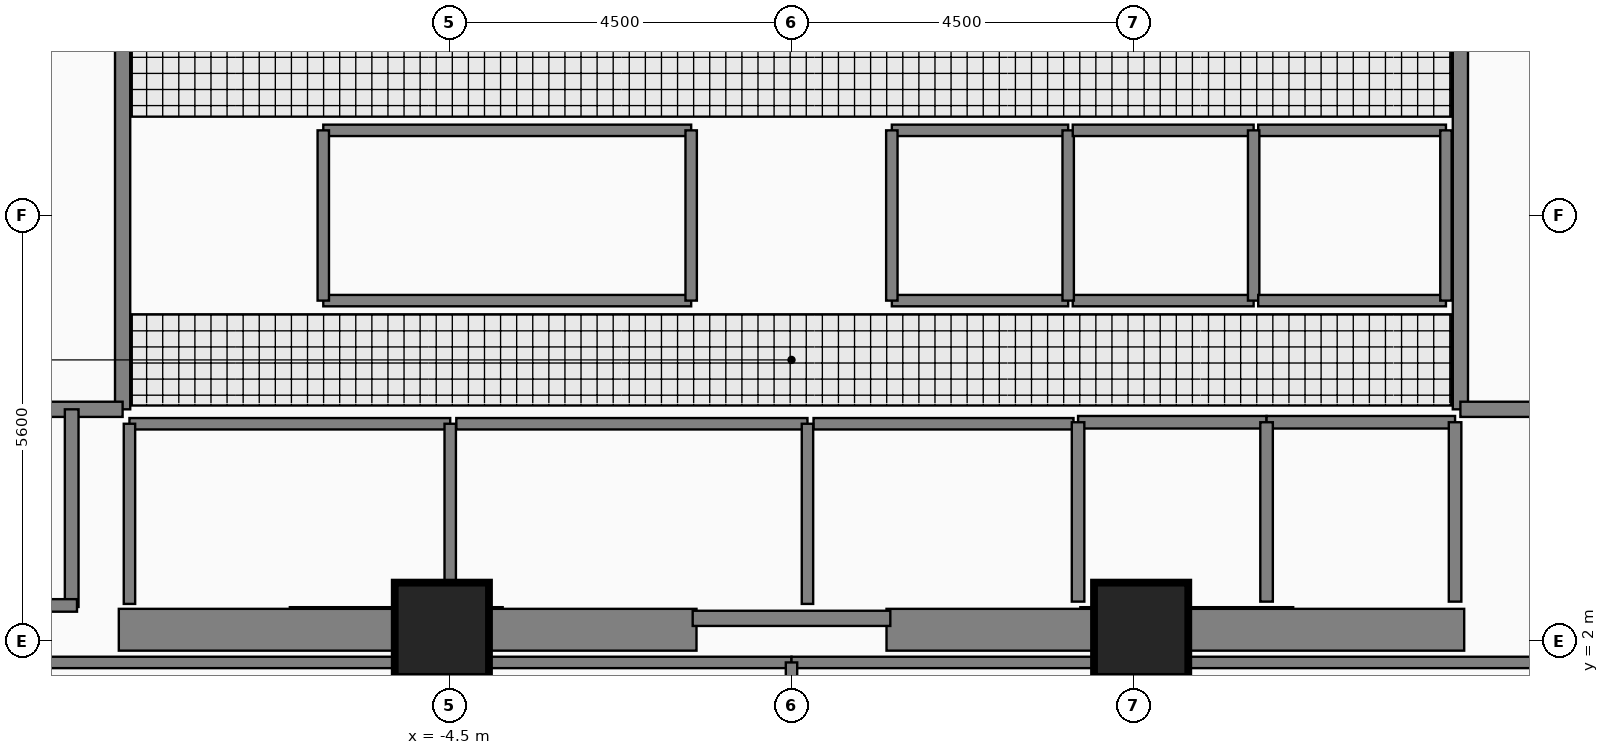
"""IFC4 building model, lengths in metres.
Left out: names, types, materials, properties, quantities, classifications, styles, units other than length and angle.
Written with IfcOpenShell. Run it as: python <this file> out.ifc"""

import sys

from ifc_helpers import new_model, si_unit, direction, frame, frame_2d, origin, origin_2d, place, context, subcontext, project, spatial, rectangle, extrude, element, fill, save


model = new_model("IFC4")
c1 = context("Model", 3, precision=1e-05, world=origin(), true_north=direction((0.0, 1.0)))
c2 = subcontext(c1, "Body", "Model", "MODEL_VIEW")
j1 = project(units=[si_unit("LENGTHUNIT", "METRE"), si_unit("PLANEANGLEUNIT", "RADIAN")], contexts=[c1])
p1 = place(None, origin())
s1 = spatial("IfcSite", under=j1, at=p1, CompositionType="ELEMENT")
p2 = place(p1, origin())
s2 = spatial("IfcBuilding", under=s1, at=p2, CompositionType="ELEMENT")
p3 = place(p2, frame((0.0, 0.0, 284.05)))
s3 = spatial("IfcBuildingStorey", under=s2, at=p3, CompositionType="ELEMENT", Elevation=284.05)
for number, where, z_axis, x_axis in (
    (1, (-8.85, 2.15, 0.0), (0.0, 0.0, 1.0), (1.0, 0.0, 0.0)),
    (2, (1.25, 2.15, 0.0), (0.0, 0.0, 1.0), (1.0, 0.0, 0.0)),
):
    element("IfcWall", number, at=place(p3, frame(where, z_axis=z_axis, x_axis=x_axis)), inside=s3, PredefinedType="SHEAR", context=c2, shape_type="SweptSolid", body=[
        extrude(rectangle(XDim=7.6, YDim=0.55, at=frame_2d((3.8, 0.0))), origin(), (0.0, 0.0, 1.0), 4.18),
    ])
for number, where, z_axis, x_axis in (
    (3, (-4.6, 2.15, 0.0), (0.0, 0.0, 1.0), (1.0, 0.0, 0.0)),
    (4, (4.6, 2.15, 0.0), (0.0, 0.0, 1.0), (1.0, 0.0, 0.0)),
):
    element("IfcColumn", number, at=place(p3, frame(where, z_axis=z_axis, x_axis=x_axis)), inside=s3, PredefinedType="COLUMN", context=c2, shape_type="SweptSolid", body=[
        extrude(rectangle(XDim=1.2, YDim=1.2, at=origin_2d()), origin(), (0.0, 0.0, 1.0), 4.4),
    ])
p4 = place(p3, frame((-8.8, 5.05, 0.0), z_axis=(0.0, 0.0, 1.0), x_axis=(0.0, 1.0, 0.0)))
e5 = element("IfcWall", 5, at=p4, inside=s3, PredefinedType="PARTITIONING", context=c2, shape_type="SweptSolid", body=[
    extrude(rectangle(XDim=6.1, YDim=0.2, at=frame_2d((3.05, 0.0))), origin(), (0.0, 0.0, 1.0), 4.18),
])
p5 = place(p4, frame((0.25, 0.0, 0.0)))
e6 = element("IfcOpeningElement", 6, at=p5, cuts=e5, PredefinedType="OPENING", context=c2, shape_type="SweptSolid", body=[
    extrude(rectangle(XDim=1.1, YDim=2.2, at=frame_2d((0.55, 1.1))), frame((0.0, 0.11, 0.0), z_axis=(0.0, -1.0, 0.0), x_axis=(1.0, 0.0, 0.0)), (0.0, 0.0, 1.0), 0.22),
])
p6 = place(p4, frame((3.85, 0.0, 0.0)))
e7 = element("IfcOpeningElement", 7, at=p6, cuts=e5, PredefinedType="OPENING", context=c2, shape_type="SweptSolid", body=[
    extrude(rectangle(XDim=1.1, YDim=2.2, at=frame_2d((0.55, 1.1))), frame((0.0, 0.11, 0.0), z_axis=(0.0, -1.0, 0.0), x_axis=(1.0, 0.0, 0.0)), (0.0, 0.0, 1.0), 0.22),
])
p7 = place(p3, frame((8.8, 11.15, 0.0), z_axis=(0.0, 0.0, 1.0), x_axis=(0.0, -1.0, 0.0)))
e8 = element("IfcWall", 8, at=p7, inside=s3, PredefinedType="PARTITIONING", context=c2, shape_type="SweptSolid", body=[
    extrude(rectangle(XDim=6.1, YDim=0.2, at=frame_2d((3.05, 0.0))), origin(), (0.0, 0.0, 1.0), 4.18),
])
p8 = place(p7, frame((1.15, 0.0, 0.0)))
e9 = element("IfcOpeningElement", 9, at=p8, cuts=e8, PredefinedType="OPENING", context=c2, shape_type="SweptSolid", body=[
    extrude(rectangle(XDim=1.1, YDim=2.2, at=frame_2d((0.55, 1.1))), frame((0.0, 0.11, 0.0), z_axis=(0.0, -1.0, 0.0), x_axis=(1.0, 0.0, 0.0)), (0.0, 0.0, 1.0), 0.22),
])
p9 = place(p7, frame((4.75, 0.0, 0.0)))
e10 = element("IfcOpeningElement", 10, at=p9, cuts=e8, PredefinedType="OPENING", context=c2, shape_type="SweptSolid", body=[
    extrude(rectangle(XDim=1.1, YDim=2.2, at=frame_2d((0.55, 1.1))), frame((0.0, 0.11, 0.0), z_axis=(0.0, -1.0, 0.0), x_axis=(1.0, 0.0, 0.0)), (0.0, 0.0, 1.0), 0.22),
])
p10 = place(p3, frame((3.77, 4.88, 0.0), z_axis=(0.0, 0.0, 1.0), x_axis=(1.0, 0.0, 0.0)))
e11 = element("IfcWall", 11, at=p10, inside=s3, PredefinedType="PARTITIONING", context=c2, shape_type="SweptSolid", body=[
    extrude(rectangle(XDim=2.48, YDim=0.165, at=frame_2d((1.24, 0.0))), origin(), (0.0, 0.0, 1.0), 4.18),
])
p11 = place(p10, frame((0.69, 0.0, 0.0)))
e12 = element("IfcOpeningElement", 12, at=p11, cuts=e11, PredefinedType="OPENING", context=c2, shape_type="SweptSolid", body=[
    extrude(rectangle(XDim=1.1, YDim=2.25, at=frame_2d((0.55, 1.125))), frame((0.0, 0.093, 0.0), z_axis=(0.0, -1.0, 0.0), x_axis=(1.0, 0.0, 0.0)), (0.0, 0.0, 1.0), 0.185),
])
p12 = place(p3, frame((6.25, 4.88, 0.0), z_axis=(0.0, 0.0, 1.0), x_axis=(1.0, 0.0, 0.0)))
e13 = element("IfcWall", 13, at=p12, inside=s3, PredefinedType="PARTITIONING", context=c2, shape_type="SweptSolid", body=[
    extrude(rectangle(XDim=2.48, YDim=0.165, at=frame_2d((1.24, 0.0))), origin(), (0.0, 0.0, 1.0), 4.18),
])
p13 = place(p12, frame((0.69, 0.0, 0.0)))
e14 = element("IfcOpeningElement", 14, at=p13, cuts=e13, PredefinedType="OPENING", context=c2, shape_type="SweptSolid", body=[
    extrude(rectangle(XDim=1.1, YDim=2.25, at=frame_2d((0.55, 1.125))), frame((0.0, 0.093, 0.0), z_axis=(0.0, -1.0, 0.0), x_axis=(1.0, 0.0, 0.0)), (0.0, 0.0, 1.0), 0.185),
])
p14 = place(p3, frame((-8.71, 4.86, 0.0), z_axis=(0.0, 0.0, 1.0), x_axis=(1.0, 0.0, 0.0)))
e15 = element("IfcWall", 15, at=p14, inside=s3, PredefinedType="PARTITIONING", context=c2, shape_type="SweptSolid", body=[
    extrude(rectangle(XDim=4.22, YDim=0.15, at=frame_2d((2.11, 0.0))), origin(), (0.0, 0.0, 1.0), 4.18),
])
p15 = place(p14, frame((1.66, 0.0, 0.0)))
e16 = element("IfcOpeningElement", 16, at=p15, cuts=e15, PredefinedType="OPENING", context=c2, shape_type="SweptSolid", body=[
    extrude(rectangle(XDim=0.9, YDim=2.15, at=frame_2d((0.45, 1.075))), frame((0.0, 0.085, 0.0), z_axis=(0.0, -1.0, 0.0), x_axis=(1.0, 0.0, 0.0)), (0.0, 0.0, 1.0), 0.17),
])
p16 = place(p3, frame((-4.41, 4.86, 0.0), z_axis=(0.0, 0.0, 1.0), x_axis=(1.0, 0.0, 0.0)))
e17 = element("IfcWall", 17, at=p16, inside=s3, PredefinedType="PARTITIONING", context=c2, shape_type="SweptSolid", body=[
    extrude(rectangle(XDim=4.62, YDim=0.15, at=frame_2d((2.31, 0.0))), origin(), (0.0, 0.0, 1.0), 4.18),
])
p17 = place(p16, frame((1.86, 0.0, 0.0)))
e18 = element("IfcOpeningElement", 18, at=p17, cuts=e17, PredefinedType="OPENING", context=c2, shape_type="SweptSolid", body=[
    extrude(rectangle(XDim=0.9, YDim=2.15, at=frame_2d((0.45, 1.075))), frame((0.0, 0.085, 0.0), z_axis=(0.0, -1.0, 0.0), x_axis=(1.0, 0.0, 0.0)), (0.0, 0.0, 1.0), 0.17),
])
p18 = place(p3, frame((0.29, 4.86, 0.0), z_axis=(0.0, 0.0, 1.0), x_axis=(1.0, 0.0, 0.0)))
e19 = element("IfcWall", 19, at=p18, inside=s3, PredefinedType="PARTITIONING", context=c2, shape_type="SweptSolid", body=[
    extrude(rectangle(XDim=3.42, YDim=0.15, at=frame_2d((1.71, 0.0))), origin(), (0.0, 0.0, 1.0), 4.18),
])
p19 = place(p18, frame((1.26, 0.0, 0.0)))
e20 = element("IfcOpeningElement", 20, at=p19, cuts=e19, PredefinedType="OPENING", context=c2, shape_type="SweptSolid", body=[
    extrude(rectangle(XDim=0.9, YDim=2.15, at=frame_2d((0.45, 1.075))), frame((0.0, 0.085, 0.0), z_axis=(0.0, -1.0, 0.0), x_axis=(1.0, 0.0, 0.0)), (0.0, 0.0, 1.0), 0.17),
])
p20 = place(p3, frame((-6.16, 6.48, 0.0), z_axis=(0.0, 0.0, 1.0), x_axis=(1.0, 0.0, 0.0)))
e21 = element("IfcWall", 21, at=p20, inside=s3, PredefinedType="PARTITIONING", context=c2, shape_type="SweptSolid", body=[
    extrude(rectangle(XDim=4.84, YDim=0.15, at=frame_2d((2.42, 0.0))), origin(), (0.0, 0.0, 1.0), 4.18),
])
p21 = place(p20, frame((1.97, 0.0, 0.0)))
e22 = element("IfcOpeningElement", 22, at=p21, cuts=e21, PredefinedType="OPENING", context=c2, shape_type="SweptSolid", body=[
    extrude(rectangle(XDim=0.9, YDim=2.15, at=frame_2d((0.45, 1.075))), frame((0.0, 0.085, 0.0), z_axis=(0.0, -1.0, 0.0), x_axis=(1.0, 0.0, 0.0)), (0.0, 0.0, 1.0), 0.17),
])
p22 = place(p3, frame((1.32, 8.72, 0.0), z_axis=(0.0, 0.0, 1.0), x_axis=(1.0, 0.0, 0.0)))
e23 = element("IfcWall", 23, at=p22, inside=s3, PredefinedType="PARTITIONING", context=c2, shape_type="SweptSolid", body=[
    extrude(rectangle(XDim=2.32, YDim=0.15, at=frame_2d((1.16, 0.0))), origin(), (0.0, 0.0, 1.0), 4.18),
])
p23 = place(p22, frame((0.71, 0.0, 0.0)))
e24 = element("IfcOpeningElement", 24, at=p23, cuts=e23, PredefinedType="OPENING", context=c2, shape_type="SweptSolid", body=[
    extrude(rectangle(XDim=0.9, YDim=2.15, at=frame_2d((0.45, 1.075))), frame((0.0, 0.085, 0.0), z_axis=(0.0, -1.0, 0.0), x_axis=(1.0, 0.0, 0.0)), (0.0, 0.0, 1.0), 0.17),
])
p24 = place(p3, frame((3.7, 6.48, 0.0), z_axis=(0.0, 0.0, 1.0), x_axis=(1.0, 0.0, 0.0)))
e25 = element("IfcWall", 25, at=p24, inside=s3, PredefinedType="PARTITIONING", context=c2, shape_type="SweptSolid", body=[
    extrude(rectangle(XDim=2.38, YDim=0.15, at=frame_2d((1.19, 0.0))), origin(), (0.0, 0.0, 1.0), 4.18),
])
p25 = place(p24, frame((0.74, 0.0, 0.0)))
e26 = element("IfcOpeningElement", 26, at=p25, cuts=e25, PredefinedType="OPENING", context=c2, shape_type="SweptSolid", body=[
    extrude(rectangle(XDim=0.9, YDim=2.15, at=frame_2d((0.45, 1.075))), frame((0.0, 0.085, 0.0), z_axis=(0.0, -1.0, 0.0), x_axis=(1.0, 0.0, 0.0)), (0.0, 0.0, 1.0), 0.17),
])
p26 = place(p3, frame((6.14, 8.72, 0.0), z_axis=(0.0, 0.0, 1.0), x_axis=(1.0, 0.0, 0.0)))
e27 = element("IfcWall", 27, at=p26, inside=s3, PredefinedType="PARTITIONING", context=c2, shape_type="SweptSolid", body=[
    extrude(rectangle(XDim=2.47, YDim=0.15, at=frame_2d((1.235, 0.0))), origin(), (0.0, 0.0, 1.0), 4.18),
])
p27 = place(p26, frame((0.785, 0.0, 0.0)))
e28 = element("IfcOpeningElement", 28, at=p27, cuts=e27, PredefinedType="OPENING", context=c2, shape_type="SweptSolid", body=[
    extrude(rectangle(XDim=0.9, YDim=2.15, at=frame_2d((0.45, 1.075))), frame((0.0, 0.085, 0.0), z_axis=(0.0, -1.0, 0.0), x_axis=(1.0, 0.0, 0.0)), (0.0, 0.0, 1.0), 0.17),
])
for number, where, z_axis, x_axis in (
    (29, (-11.65, 5.05, 0.0), (0.0, 0.0, 1.0), (1.0, 0.0, 0.0)),
    (30, (8.8, 5.05, 0.0), (0.0, 0.0, 1.0), (1.0, 0.0, 0.0)),
):
    element("IfcWall", number, at=place(p3, frame(where, z_axis=z_axis, x_axis=x_axis)), inside=s3, PredefinedType="PARTITIONING", context=c2, shape_type="SweptSolid", body=[
        extrude(rectangle(XDim=2.85, YDim=0.2, at=frame_2d((1.425, 0.0))), origin(), (0.0, 0.0, 1.0), 4.18),
    ])
for number, where, z_axis, x_axis in (
    (31, (3.77, 2.52, 0.0), (0.0, 0.0, 1.0), (0.0, 1.0, 0.0)),
    (32, (6.25, 2.52, 0.0), (0.0, 0.0, 1.0), (0.0, 1.0, 0.0)),
    (33, (8.73, 2.52, 0.0), (0.0, 0.0, 1.0), (0.0, 1.0, 0.0)),
):
    element("IfcWall", number, at=place(p3, frame(where, z_axis=z_axis, x_axis=x_axis)), inside=s3, PredefinedType="PARTITIONING", context=c2, shape_type="SweptSolid", body=[
        extrude(rectangle(XDim=2.36, YDim=0.165, at=frame_2d((1.18, 0.0))), origin(), (0.0, 0.0, 1.0), 4.18),
    ])
p28 = place(p3, frame((-1.3, 2.3, 0.0), z_axis=(0.0, 0.0, 1.0), x_axis=(1.0, 0.0, 0.0)))
e34 = element("IfcWall", 34, at=p28, inside=s3, PredefinedType="PARTITIONING", context=c2, shape_type="SweptSolid", body=[
    extrude(rectangle(XDim=2.6, YDim=0.2, at=frame_2d((1.3, 0.0))), origin(), (0.0, 0.0, 1.0), 3.08),
])
for number, where, z_axis, x_axis in (
    (35, (-8.71, 2.49, 0.0), (0.0, 0.0, 1.0), (0.0, 1.0, 0.0)),
    (36, (-4.49, 2.49, 0.0), (0.0, 0.0, 1.0), (0.0, 1.0, 0.0)),
    (37, (0.21, 2.49, 0.0), (0.0, 0.0, 1.0), (0.0, 1.0, 0.0)),
):
    element("IfcWall", number, at=place(p3, frame(where, z_axis=z_axis, x_axis=x_axis)), inside=s3, PredefinedType="PARTITIONING", context=c2, shape_type="SweptSolid", body=[
        extrude(rectangle(XDim=2.37, YDim=0.15, at=frame_2d((1.185, 0.0))), origin(), (0.0, 0.0, 1.0), 4.18),
    ])
p29 = place(p3, frame((-9.47, 2.45, 0.0), z_axis=(0.0, 0.0, 1.0), x_axis=(0.0, 1.0, 0.0)))
e38 = element("IfcWall", 38, at=p29, inside=s3, PredefinedType="PARTITIONING", context=c2, shape_type="SweptSolid", body=[
    extrude(rectangle(XDim=2.6, YDim=0.18, at=frame_2d((1.3, 0.0))), origin(), (0.0, 0.0, 1.0), 4.18),
])
p30 = place(p3, frame((-11.71, 2.47, 0.0), z_axis=(0.0, 0.0, 1.0), x_axis=(1.0, 0.0, 0.0)))
e39 = element("IfcWall", 39, at=p30, inside=s3, PredefinedType="PARTITIONING", context=c2, shape_type="SweptSolid", body=[
    extrude(rectangle(XDim=2.31, YDim=0.165, at=frame_2d((1.155, 0.0))), origin(), (0.0, 0.0, 1.0), 3.08),
])
p31 = place(p3, frame((-6.16, 8.72, 0.0), z_axis=(0.0, 0.0, 1.0), x_axis=(1.0, 0.0, 0.0)))
e40 = element("IfcWall", 40, at=p31, inside=s3, PredefinedType="PARTITIONING", context=c2, shape_type="SweptSolid", body=[
    extrude(rectangle(XDim=4.84, YDim=0.15, at=frame_2d((2.42, 0.0))), origin(), (0.0, 0.0, 1.0), 4.18),
])
for number, where, z_axis, x_axis in (
    (41, (-6.16, 6.48, 0.0), (0.0, 0.0, 1.0), (0.0, 1.0, 0.0)),
    (42, (-1.32, 6.48, 0.0), (0.0, 0.0, 1.0), (0.0, 1.0, 0.0)),
):
    element("IfcWall", number, at=place(p3, frame(where, z_axis=z_axis, x_axis=x_axis)), inside=s3, PredefinedType="PARTITIONING", context=c2, shape_type="SweptSolid", body=[
        extrude(rectangle(XDim=2.24, YDim=0.15, at=frame_2d((1.12, 0.0))), origin(), (0.0, 0.0, 1.0), 4.18),
    ])
p32 = place(p3, frame((1.32, 6.48, 0.0), z_axis=(0.0, 0.0, 1.0), x_axis=(1.0, 0.0, 0.0)))
e43 = element("IfcWall", 43, at=p32, inside=s3, PredefinedType="PARTITIONING", context=c2, shape_type="SweptSolid", body=[
    extrude(rectangle(XDim=2.32, YDim=0.15, at=frame_2d((1.16, 0.0))), origin(), (0.0, 0.0, 1.0), 4.18),
])
for number, where, z_axis, x_axis in (
    (44, (1.32, 6.48, 0.0), (0.0, 0.0, 1.0), (0.0, 1.0, 0.0)),
    (45, (3.64, 6.48, 0.0), (0.0, 0.0, 1.0), (0.0, 1.0, 0.0)),
):
    element("IfcWall", number, at=place(p3, frame(where, z_axis=z_axis, x_axis=x_axis)), inside=s3, PredefinedType="PARTITIONING", context=c2, shape_type="SweptSolid", body=[
        extrude(rectangle(XDim=2.24, YDim=0.15, at=frame_2d((1.12, 0.0))), origin(), (0.0, 0.0, 1.0), 4.18),
    ])
p33 = place(p3, frame((3.7, 8.72, 0.0), z_axis=(0.0, 0.0, 1.0), x_axis=(1.0, 0.0, 0.0)))
e46 = element("IfcWall", 46, at=p33, inside=s3, PredefinedType="PARTITIONING", context=c2, shape_type="SweptSolid", body=[
    extrude(rectangle(XDim=2.38, YDim=0.15, at=frame_2d((1.19, 0.0))), origin(), (0.0, 0.0, 1.0), 4.18),
])
p34 = place(p3, frame((6.08, 6.48, 0.0), z_axis=(0.0, 0.0, 1.0), x_axis=(0.0, 1.0, 0.0)))
e47 = element("IfcWall", 47, at=p34, inside=s3, PredefinedType="PARTITIONING", context=c2, shape_type="SweptSolid", body=[
    extrude(rectangle(XDim=2.24, YDim=0.15, at=frame_2d((1.12, 0.0))), origin(), (0.0, 0.0, 1.0), 4.18),
])
p35 = place(p3, frame((6.14, 6.48, 0.0), z_axis=(0.0, 0.0, 1.0), x_axis=(1.0, 0.0, 0.0)))
e48 = element("IfcWall", 48, at=p35, inside=s3, PredefinedType="PARTITIONING", context=c2, shape_type="SweptSolid", body=[
    extrude(rectangle(XDim=2.47, YDim=0.15, at=frame_2d((1.235, 0.0))), origin(), (0.0, 0.0, 1.0), 4.18),
])
p36 = place(p3, frame((8.61, 6.48, 0.0), z_axis=(0.0, 0.0, 1.0), x_axis=(0.0, 1.0, 0.0)))
e49 = element("IfcWall", 49, at=p36, inside=s3, PredefinedType="PARTITIONING", context=c2, shape_type="SweptSolid", body=[
    extrude(rectangle(XDim=2.24, YDim=0.15, at=frame_2d((1.12, 0.0))), origin(), (0.0, 0.0, 1.0), 4.18),
])
for number, where, z_axis, x_axis in (
    (50, (-11.68, 1.72, 0.0), (0.0, 0.0, 1.0), (1.0, 0.0, 0.0)),
    (51, (0.0, 1.72, 0.0), (0.0, 0.0, 1.0), (1.0, 0.0, 0.0)),
):
    element("IfcWall", number, at=place(p3, frame(where, z_axis=z_axis, x_axis=x_axis)), inside=s3, PredefinedType="PARTITIONING", context=c2, shape_type="SweptSolid", body=[
        extrude(rectangle(XDim=11.68, YDim=0.15, at=frame_2d((5.84, 0.0))), origin(), (0.0, 0.0, 1.0), 3.08),
    ])
p37 = place(p3, frame((0.0, 0.06, 0.0), z_axis=(0.0, 0.0, 1.0), x_axis=(0.0, 1.0, 0.0)))
e52 = element("IfcWall", 52, at=p37, inside=s3, PredefinedType="PARTITIONING", context=c2, shape_type="SweptSolid", body=[
    extrude(rectangle(XDim=1.66, YDim=0.15, at=frame_2d((0.83, 0.0))), origin(), (0.0, 0.0, 1.0), 4.18),
])
p38 = place(p5, origin())
e53 = element("IfcDoor", 53, at=p38, inside=s3, OperationType="SINGLE_SWING_LEFT", PredefinedType="DOOR", context=c2, shape_type="SweptSolid", body=[
    extrude(rectangle(XDim=1.1, YDim=2.2, at=frame_2d((0.55, 1.1))), frame((0.0, 0.025, 0.0), z_axis=(0.0, -1.0, 0.0), x_axis=(1.0, 0.0, 0.0)), (0.0, 0.0, 1.0), 0.05),
])
fill(e6, e53)
p39 = place(p6, origin())
e54 = element("IfcDoor", 54, at=p39, inside=s3, OperationType="SINGLE_SWING_RIGHT", PredefinedType="DOOR", context=c2, shape_type="SweptSolid", body=[
    extrude(rectangle(XDim=1.1, YDim=2.2, at=frame_2d((0.55, 1.1))), frame((0.0, 0.025, 0.0), z_axis=(0.0, -1.0, 0.0), x_axis=(1.0, 0.0, 0.0)), (0.0, 0.0, 1.0), 0.05),
])
fill(e7, e54)
p40 = place(p8, origin())
e55 = element("IfcDoor", 55, at=p40, inside=s3, OperationType="SINGLE_SWING_LEFT", PredefinedType="DOOR", context=c2, shape_type="SweptSolid", body=[
    extrude(rectangle(XDim=1.1, YDim=2.2, at=frame_2d((0.55, 1.1))), frame((0.0, 0.025, 0.0), z_axis=(0.0, -1.0, 0.0), x_axis=(1.0, 0.0, 0.0)), (0.0, 0.0, 1.0), 0.05),
])
fill(e9, e55)
p41 = place(p9, origin())
e56 = element("IfcDoor", 56, at=p41, inside=s3, OperationType="SINGLE_SWING_RIGHT", PredefinedType="DOOR", context=c2, shape_type="SweptSolid", body=[
    extrude(rectangle(XDim=1.1, YDim=2.2, at=frame_2d((0.55, 1.1))), frame((0.0, 0.025, 0.0), z_axis=(0.0, -1.0, 0.0), x_axis=(1.0, 0.0, 0.0)), (0.0, 0.0, 1.0), 0.05),
])
fill(e10, e56)
p42 = place(p11, origin())
e57 = element("IfcDoor", 57, at=p42, inside=s3, OperationType="SLIDING_TO_LEFT", PredefinedType="DOOR", context=c2, shape_type="SweptSolid", body=[
    extrude(rectangle(XDim=1.1, YDim=2.25, at=frame_2d((0.55, 1.125))), frame((0.0, 0.025, 0.0), z_axis=(0.0, -1.0, 0.0), x_axis=(1.0, 0.0, 0.0)), (0.0, 0.0, 1.0), 0.05),
])
fill(e12, e57)
p43 = place(p13, origin())
e58 = element("IfcDoor", 58, at=p43, inside=s3, OperationType="SLIDING_TO_LEFT", PredefinedType="DOOR", context=c2, shape_type="SweptSolid", body=[
    extrude(rectangle(XDim=1.1, YDim=2.25, at=frame_2d((0.55, 1.125))), frame((0.0, 0.025, 0.0), z_axis=(0.0, -1.0, 0.0), x_axis=(1.0, 0.0, 0.0)), (0.0, 0.0, 1.0), 0.05),
])
fill(e14, e58)
p44 = place(p15, origin())
e59 = element("IfcDoor", 59, at=p44, inside=s3, OperationType="SINGLE_SWING_LEFT", PredefinedType="DOOR", context=c2, shape_type="SweptSolid", body=[
    extrude(rectangle(XDim=0.9, YDim=2.15, at=frame_2d((0.45, 1.075))), frame((0.0, 0.025, 0.0), z_axis=(0.0, -1.0, 0.0), x_axis=(1.0, 0.0, 0.0)), (0.0, 0.0, 1.0), 0.05),
])
fill(e16, e59)
p45 = place(p17, origin())
e60 = element("IfcDoor", 60, at=p45, inside=s3, OperationType="SINGLE_SWING_RIGHT", PredefinedType="DOOR", context=c2, shape_type="SweptSolid", body=[
    extrude(rectangle(XDim=0.9, YDim=2.15, at=frame_2d((0.45, 1.075))), frame((0.0, 0.025, 0.0), z_axis=(0.0, -1.0, 0.0), x_axis=(1.0, 0.0, 0.0)), (0.0, 0.0, 1.0), 0.05),
])
fill(e18, e60)
p46 = place(p19, origin())
e61 = element("IfcDoor", 61, at=p46, inside=s3, OperationType="SINGLE_SWING_LEFT", PredefinedType="DOOR", context=c2, shape_type="SweptSolid", body=[
    extrude(rectangle(XDim=0.9, YDim=2.15, at=frame_2d((0.45, 1.075))), frame((0.0, 0.025, 0.0), z_axis=(0.0, -1.0, 0.0), x_axis=(1.0, 0.0, 0.0)), (0.0, 0.0, 1.0), 0.05),
])
fill(e20, e61)
p47 = place(p21, origin())
e62 = element("IfcDoor", 62, at=p47, inside=s3, OperationType="SINGLE_SWING_RIGHT", PredefinedType="DOOR", context=c2, shape_type="SweptSolid", body=[
    extrude(rectangle(XDim=0.9, YDim=2.15, at=frame_2d((0.45, 1.075))), frame((0.0, 0.025, 0.0), z_axis=(0.0, -1.0, 0.0), x_axis=(1.0, 0.0, 0.0)), (0.0, 0.0, 1.0), 0.05),
])
fill(e22, e62)
p48 = place(p23, origin())
e63 = element("IfcDoor", 63, at=p48, inside=s3, OperationType="SINGLE_SWING_LEFT", PredefinedType="DOOR", context=c2, shape_type="SweptSolid", body=[
    extrude(rectangle(XDim=0.9, YDim=2.15, at=frame_2d((0.45, 1.075))), frame((0.0, 0.025, 0.0), z_axis=(0.0, -1.0, 0.0), x_axis=(1.0, 0.0, 0.0)), (0.0, 0.0, 1.0), 0.05),
])
fill(e24, e63)
p49 = place(p25, origin())
e64 = element("IfcDoor", 64, at=p49, inside=s3, OperationType="SINGLE_SWING_RIGHT", PredefinedType="DOOR", context=c2, shape_type="SweptSolid", body=[
    extrude(rectangle(XDim=0.9, YDim=2.15, at=frame_2d((0.45, 1.075))), frame((0.0, 0.025, 0.0), z_axis=(0.0, -1.0, 0.0), x_axis=(1.0, 0.0, 0.0)), (0.0, 0.0, 1.0), 0.05),
])
fill(e26, e64)
p50 = place(p27, origin())
e65 = element("IfcDoor", 65, at=p50, inside=s3, OperationType="SINGLE_SWING_LEFT", PredefinedType="DOOR", context=c2, shape_type="SweptSolid", body=[
    extrude(rectangle(XDim=0.9, YDim=2.15, at=frame_2d((0.45, 1.075))), frame((0.0, 0.025, 0.0), z_axis=(0.0, -1.0, 0.0), x_axis=(1.0, 0.0, 0.0)), (0.0, 0.0, 1.0), 0.05),
])
fill(e28, e65)
save(model, sys.argv[1])
